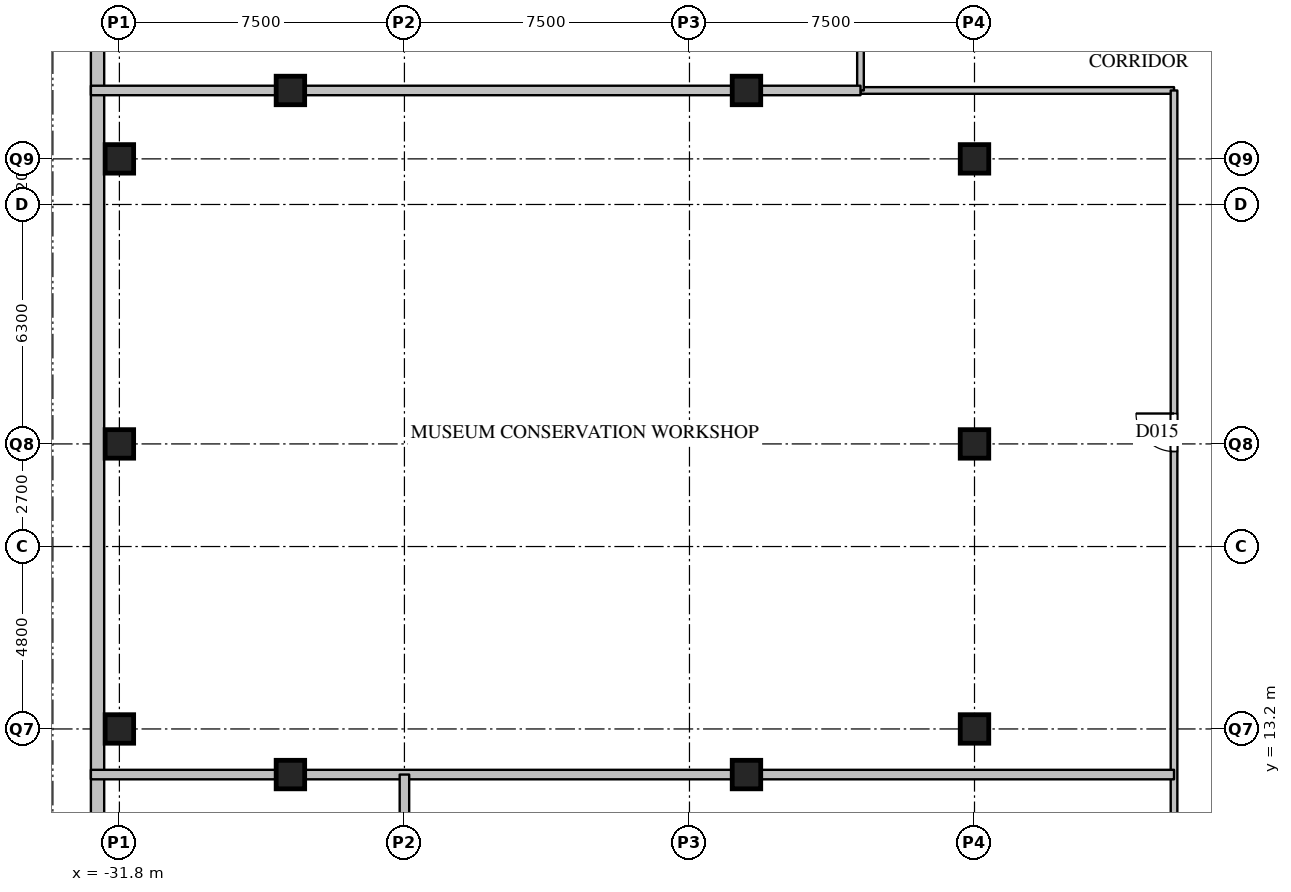
"""IFC4 building model, lengths in metres.
Left out: names, types, materials, properties, quantities, classifications, styles, units other than length and angle.
Written with IfcOpenShell. Run it as: python <this file> out.ifc"""

import sys

from ifc_helpers import new_model, si_unit, direction, frame, frame_2d, origin, origin_2d, place, context, subcontext, project, spatial, rectangle, extrude, element, fill, save


model = new_model("IFC4")
c1 = context("Model", 3, precision=1e-05, world=origin(), true_north=direction((0.0, 1.0)))
c2 = subcontext(c1, "Body", "Model", "MODEL_VIEW")
j1 = project(units=[si_unit("LENGTHUNIT", "METRE"), si_unit("PLANEANGLEUNIT", "RADIAN")], contexts=[c1])
p1 = place(None, origin())
s1 = spatial("IfcSite", under=j1, at=p1, CompositionType="ELEMENT")
p2 = place(p1, origin())
s2 = spatial("IfcBuilding", under=s1, at=p2, CompositionType="ELEMENT")
p3 = place(p2, frame((0.0, 0.0, -6.0)))
s3 = spatial("IfcBuildingStorey", under=s2, at=p3, CompositionType="ELEMENT", Elevation=-6.0)
p4 = place(p3, frame((-32.375, -20.95, 0.0), z_axis=(0.0, 0.0, 1.0), x_axis=(0.0, 1.0, 0.0)))
e1 = element("IfcWall", 1, at=p4, inside=s3, PredefinedType="SOLIDWALL", context=c2, shape_type="SweptSolid", body=[
    extrude(rectangle(XDim=68.3, YDim=0.35, at=frame_2d((34.15, 0.0))), origin(), (0.0, 0.0, 1.0), 5.59),
])
for number, where, z_axis, x_axis in (
    (2, (-31.8, 13.2, 0.0), (0.0, 0.0, 1.0), (1.0, 0.0, 0.0)),
    (3, (-31.8, 20.7, 0.0), (0.0, 0.0, 1.0), (1.0, 0.0, 0.0)),
    (4, (-31.8, 28.2, 0.0), (0.0, 0.0, 1.0), (1.0, 0.0, 0.0)),
    (5, (-9.3, 13.2, 0.0), (0.0, 0.0, 1.0), (1.0, 0.0, 0.0)),
    (6, (-9.3, 20.7, 0.0), (0.0, 0.0, 1.0), (1.0, 0.0, 0.0)),
    (7, (-9.3, 28.2, 0.0), (0.0, 0.0, 1.0), (1.0, 0.0, 0.0)),
    (8, (-27.3, 12.0, 0.0), (0.0, 0.0, 1.0), (1.0, 0.0, 0.0)),
    (9, (-15.3, 12.0, 0.0), (0.0, 0.0, 1.0), (1.0, 0.0, 0.0)),
    (10, (-15.3, 30.0, 0.0), (0.0, 0.0, 1.0), (1.0, 0.0, 0.0)),
    (11, (-27.3, 30.0, 0.0), (0.0, 0.0, 1.0), (1.0, 0.0, 0.0)),
):
    element("IfcColumn", number, at=place(p3, frame(where, z_axis=z_axis, x_axis=x_axis)), inside=s3, PredefinedType="COLUMN", context=c2, shape_type="SweptSolid", body=[
        extrude(rectangle(XDim=0.75, YDim=0.75, at=origin_2d()), origin(), (0.0, 0.0, 1.0), 6.0),
    ])
p5 = place(p3, frame((-12.3, 30.0, 0.0), z_axis=(0.0, 0.0, 1.0), x_axis=(1.0, 0.0, 0.0)))
e12 = element("IfcWall", 12, at=p5, inside=s3, PredefinedType="PARTITIONING", context=c2, shape_type="SweptSolid", body=[
    extrude(rectangle(XDim=8.25, YDim=0.175, at=frame_2d((4.125, 0.0))), origin(), (0.0, 0.0, 1.0), 4.79),
])
p6 = place(p3, frame((-12.3, 30.0, 0.0), z_axis=(0.0, 0.0, 1.0), x_axis=(0.0, 1.0, 0.0)))
e13 = element("IfcWall", 13, at=p6, inside=s3, PredefinedType="PARTITIONING", context=c2, shape_type="SweptSolid", body=[
    extrude(rectangle(XDim=28.95, YDim=0.175, at=frame_2d((14.475, 0.0))), origin(), (0.0, 0.0, 1.0), 4.79),
])
p7 = place(p6, frame((13.975, 0.0, 0.0)))
e14 = element("IfcOpeningElement", 14, at=p7, cuts=e13, PredefinedType="OPENING", context=c2, shape_type="SweptSolid", body=[
    extrude(rectangle(XDim=1.0, YDim=2.1, at=frame_2d((0.5, 1.05))), frame((0.0, 0.097, 0.0), z_axis=(0.0, -1.0, 0.0), x_axis=(1.0, 0.0, 0.0)), (0.0, 0.0, 1.0), 0.195),
])
p8 = place(p3, frame((-4.05, -4.05, 0.0), z_axis=(0.0, 0.0, 1.0), x_axis=(0.0, 1.0, 0.0)))
e15 = element("IfcWall", 15, at=p8, inside=s3, PredefinedType="PARTITIONING", context=c2, shape_type="SweptSolid", body=[
    extrude(rectangle(XDim=34.05, YDim=0.175, at=frame_2d((17.025, 0.0))), origin(), (0.0, 0.0, 1.0), 4.79),
])
p9 = place(p8, frame((24.55, 0.0, 0.0)))
e16 = element("IfcOpeningElement", 16, at=p9, cuts=e15, PredefinedType="OPENING", context=c2, shape_type="SweptSolid", body=[
    extrude(rectangle(XDim=1.0, YDim=2.1, at=frame_2d((0.5, 1.05))), frame((0.0, 0.097, 0.0), z_axis=(0.0, -1.0, 0.0), x_axis=(1.0, 0.0, 0.0)), (0.0, 0.0, 1.0), 0.195),
])
p10 = place(p8, frame((7.525, 0.0, 0.0)))
e17 = element("IfcOpeningElement", 17, at=p10, cuts=e15, PredefinedType="OPENING", context=c2, shape_type="SweptSolid", body=[
    extrude(rectangle(XDim=1.0, YDim=2.1, at=frame_2d((0.5, 1.05))), frame((0.0, 0.097, 0.0), z_axis=(0.0, -1.0, 0.0), x_axis=(1.0, 0.0, 0.0)), (0.0, 0.0, 1.0), 0.195),
])
p11 = place(p3, frame((-32.55, 12.0, 0.0), z_axis=(0.0, 0.0, 1.0), x_axis=(1.0, 0.0, 0.0)))
e18 = element("IfcWall", 18, at=p11, inside=s3, PredefinedType="PARTITIONING", context=c2, shape_type="SweptSolid", body=[
    extrude(rectangle(XDim=28.5, YDim=0.25, at=frame_2d((14.25, 0.0))), origin(), (0.0, 0.0, 1.0), 4.79),
])
p12 = place(p3, frame((-32.55, 30.0, 0.0), z_axis=(0.0, 0.0, 1.0), x_axis=(1.0, 0.0, 0.0)))
e19 = element("IfcWall", 19, at=p12, inside=s3, PredefinedType="PARTITIONING", context=c2, shape_type="SweptSolid", body=[
    extrude(rectangle(XDim=20.25, YDim=0.25, at=frame_2d((10.125, 0.0))), origin(), (0.0, 0.0, 1.0), 4.79),
])
p13 = place(p3, frame((-24.3, -20.95, 0.0), z_axis=(0.0, 0.0, 1.0), x_axis=(0.0, 1.0, 0.0)))
e20 = element("IfcWall", 20, at=p13, inside=s3, PredefinedType="PARTITIONING", context=c2, shape_type="SweptSolid", body=[
    extrude(rectangle(XDim=32.95, YDim=0.25, at=frame_2d((16.475, 0.0))), origin(), (0.0, 0.0, 1.0), 4.79),
])
p14 = place(p13, frame((21.8, 0.0, 0.0)))
e21 = element("IfcOpeningElement", 21, at=p14, cuts=e20, PredefinedType="OPENING", context=c2, shape_type="SweptSolid", body=[
    extrude(rectangle(XDim=1.0, YDim=2.1, at=frame_2d((0.5, 1.05))), frame((0.0, 0.135, 0.0), z_axis=(0.0, -1.0, 0.0), x_axis=(1.0, 0.0, 0.0)), (0.0, 0.0, 1.0), 0.27),
])
p15 = place(p9, origin())
e22 = element("IfcDoor", 22, at=p15, inside=s3, OperationType="SINGLE_SWING_RIGHT", PredefinedType="DOOR", context=c2, shape_type="SweptSolid", body=[
    extrude(rectangle(XDim=1.0, YDim=2.1, at=frame_2d((0.5, 1.05))), frame((0.0, 0.025, 0.0), z_axis=(0.0, -1.0, 0.0), x_axis=(1.0, 0.0, 0.0)), (0.0, 0.0, 1.0), 0.05),
])
fill(e16, e22)
save(model, sys.argv[1])
